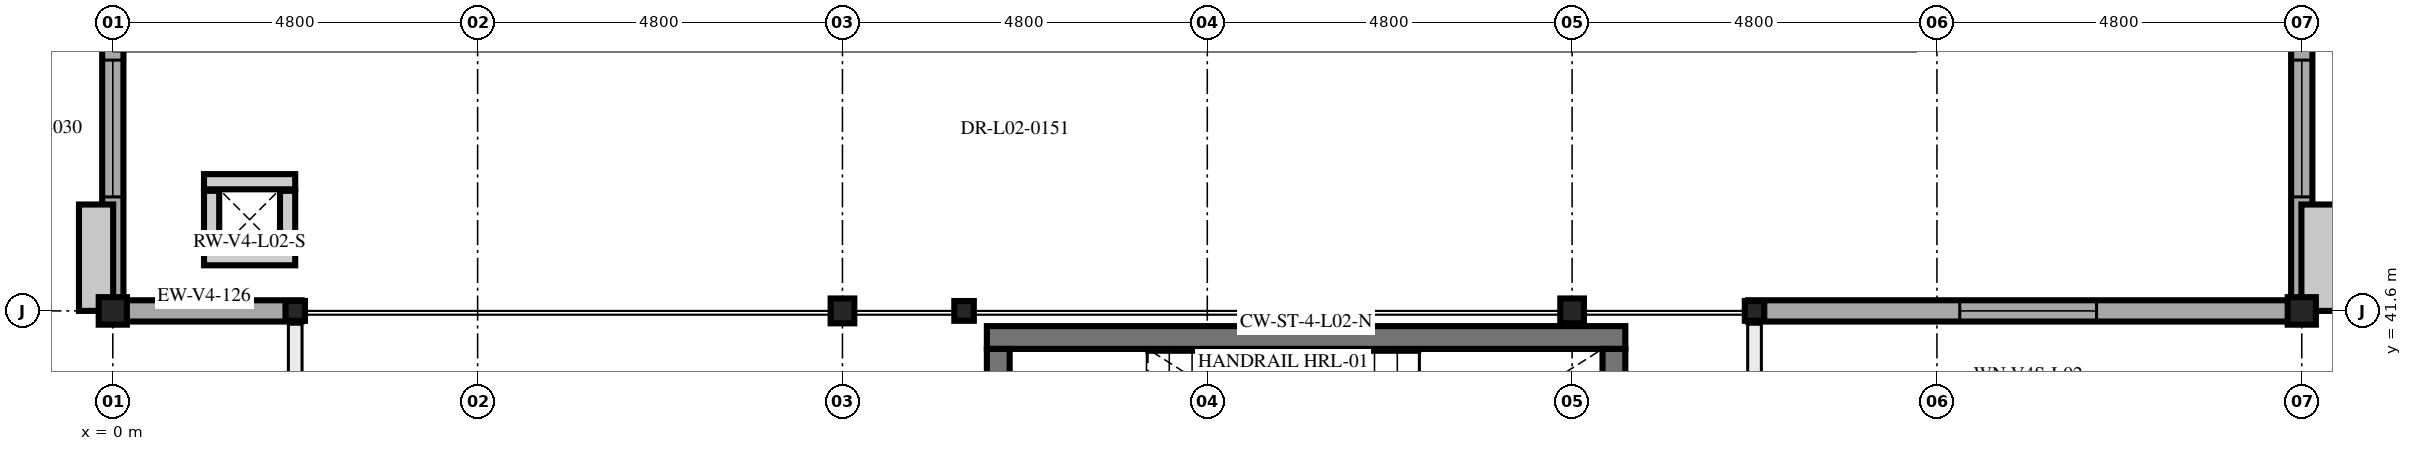
"""IFC4 building model, lengths in metres.
Left out: names, types, materials, properties, quantities, classifications, styles, units other than length and angle.
Written with IfcOpenShell. Run it as: python <this file> out.ifc"""

import sys

from ifc_helpers import new_model, si_unit, direction, frame, frame_2d, origin, origin_2d, place, context, subcontext, project, spatial, rectangle, i_section, extrude, element, fill, save


model = new_model("IFC4")
c1 = context("Model", 3, precision=1e-05, world=origin(), true_north=direction((0.0, 1.0)))
c2 = subcontext(c1, "Body", "Model", "MODEL_VIEW")
j1 = project(units=[si_unit("LENGTHUNIT", "METRE"), si_unit("PLANEANGLEUNIT", "RADIAN")], contexts=[c1])
p1 = place(None, origin())
s1 = spatial("IfcSite", under=j1, at=p1, CompositionType="ELEMENT")
p2 = place(p1, origin())
s2 = spatial("IfcBuilding", under=s1, at=p2, CompositionType="ELEMENT")
p3 = place(p2, frame((0.0, 0.0, 9.6)))
s3 = spatial("IfcBuildingStorey", under=s2, at=p3, CompositionType="ELEMENT", Elevation=9.6)
for number, where, z_axis, x_axis in (
    (1, (0.0, 41.6, 0.0), (0.0, 0.0, 1.0), (1.0, 0.0, 0.0)),
    (2, (28.8, 41.6, 0.0), (0.0, 0.0, 1.0), (1.0, 0.0, 0.0)),
):
    element("IfcColumn", number, at=place(p3, frame(where, z_axis=z_axis, x_axis=x_axis)), inside=s3, PredefinedType="COLUMN", context=c2, shape_type="SweptSolid", body=[
        extrude(i_section(OverallWidth=0.371, OverallDepth=0.362, WebThickness=0.012, FlangeThickness=0.021, at=origin_2d()), origin(), (0.0, 0.0, 1.0), 4.5),
    ])
for number, where, z_axis, x_axis in (
    (3, (9.6, 41.6, 0.0), (0.0, 0.0, 1.0), (1.0, 0.0, 0.0)),
    (4, (19.2, 41.6, 0.0), (0.0, 0.0, 1.0), (1.0, 0.0, 0.0)),
):
    element("IfcColumn", number, at=place(p3, frame(where, z_axis=z_axis, x_axis=x_axis)), inside=s3, PredefinedType="COLUMN", context=c2, shape_type="SweptSolid", body=[
        extrude(i_section(OverallWidth=0.311, OverallDepth=0.327, WebThickness=0.016, FlangeThickness=0.025, at=origin_2d()), origin(), (0.0, 0.0, 1.0), 4.5),
    ])
for number, where, z_axis, x_axis in (
    (5, (2.4, 41.6, 0.0), (0.0, 0.0, 1.0), (1.0, 0.0, 0.0)),
    (6, (11.2, 41.6, 0.0), (0.0, 0.0, 1.0), (1.0, 0.0, 0.0)),
    (7, (21.6, 41.6, 0.0), (0.0, 0.0, 1.0), (1.0, 0.0, 0.0)),
):
    element("IfcColumn", number, at=place(p3, frame(where, z_axis=z_axis, x_axis=x_axis)), inside=s3, PredefinedType="COLUMN", context=c2, shape_type="SweptSolid", body=[
        extrude(i_section(OverallWidth=0.256, OverallDepth=0.26, WebThickness=0.01, FlangeThickness=0.017, at=origin_2d()), origin(), (0.0, 0.0, 1.0), 4.5),
    ])
p4 = place(p3, frame((11.5, 41.25, 0.0), z_axis=(0.0, 0.0, 1.0), x_axis=(1.0, 0.0, 0.0)))
e8 = element("IfcWall", 8, at=p4, inside=s3, PredefinedType="SHEAR", context=c2, shape_type="SweptSolid", body=[
    extrude(rectangle(XDim=8.4, YDim=0.3, at=frame_2d((4.2, 0.0))), origin(), (0.0, 0.0, 1.0), 4.26),
])
p5 = place(p3, frame((11.65, 37.3, 0.0), z_axis=(0.0, 0.0, 1.0), x_axis=(0.0, 1.0, 0.0)))
e9 = element("IfcWall", 9, at=p5, inside=s3, PredefinedType="SHEAR", context=c2, shape_type="SweptSolid", body=[
    extrude(rectangle(XDim=3.8, YDim=0.3, at=frame_2d((1.9, 0.0))), origin(), (0.0, 0.0, 1.0), 4.26),
])
p6 = place(p5, frame((1.35, 0.0, 0.0)))
e10 = element("IfcOpeningElement", 10, at=p6, cuts=e9, PredefinedType="OPENING", context=c2, shape_type="SweptSolid", body=[
    extrude(rectangle(XDim=1.1, YDim=2.2, at=frame_2d((0.55, 1.1))), frame((0.0, 0.16, 0.0), z_axis=(0.0, -1.0, 0.0), x_axis=(1.0, 0.0, 0.0)), (0.0, 0.0, 1.0), 0.32),
])
p7 = place(p3, frame((19.75, 41.1, 0.0), z_axis=(0.0, 0.0, 1.0), x_axis=(0.0, -1.0, 0.0)))
e11 = element("IfcWall", 11, at=p7, inside=s3, PredefinedType="SHEAR", context=c2, shape_type="SweptSolid", body=[
    extrude(rectangle(XDim=3.8, YDim=0.3, at=frame_2d((1.9, 0.0))), origin(), (0.0, 0.0, 1.0), 4.26),
])
for number, where, z_axis, x_axis in (
    (12, (2.4, 42.3, 0.0), (0.0, 0.0, 1.0), (-1.0, 0.0, 0.0)),
    (13, (1.2, 43.3, 0.0), (0.0, 0.0, 1.0), (1.0, 0.0, 0.0)),
):
    element("IfcWall", number, at=place(p3, frame(where, z_axis=z_axis, x_axis=x_axis)), inside=s3, PredefinedType="PARTITIONING", context=c2, shape_type="SweptSolid", body=[
        extrude(rectangle(XDim=1.2, YDim=0.2, at=frame_2d((0.6, 0.0))), origin(), (0.0, 0.0, 1.0), 3.76),
    ])
for number, where, z_axis, x_axis in (
    (14, (1.3, 42.42, 0.0), (0.0, 0.0, 1.0), (0.0, 1.0, 0.0)),
    (15, (2.3, 43.18, 0.0), (0.0, 0.0, 1.0), (0.0, -1.0, 0.0)),
):
    element("IfcWall", number, at=place(p3, frame(where, z_axis=z_axis, x_axis=x_axis)), inside=s3, PredefinedType="PARTITIONING", context=c2, shape_type="SweptSolid", body=[
        extrude(rectangle(XDim=0.76, YDim=0.2, at=frame_2d((0.38, 0.0))), origin(), (0.0, 0.0, 1.0), 3.76),
    ])
p8 = place(p3, frame((2.485, 41.6, 0.0), z_axis=(0.0, 0.0, 1.0), x_axis=(-1.0, 0.0, 0.0)))
e16 = element("IfcWall", 16, at=p8, inside=s3, PredefinedType="SOLIDWALL", context=c2, shape_type="SweptSolid", body=[
    extrude(rectangle(XDim=2.57, YDim=0.28, at=frame_2d((1.285, 0.0))), origin(), (0.0, 0.0, 1.0), 3.702),
])
p9 = place(p3, frame((28.885, 41.6, 0.0), z_axis=(0.0, 0.0, 1.0), x_axis=(-1.0, 0.0, 0.0)))
e17 = element("IfcWall", 17, at=p9, inside=s3, PredefinedType="SOLIDWALL", context=c2, shape_type="SweptSolid", body=[
    extrude(rectangle(XDim=7.37, YDim=0.28, at=frame_2d((3.685, 0.0))), origin(), (0.0, 0.0, 1.0), 3.702),
])
p10 = place(p9, frame((2.785, 0.0, 1.0)))
e18 = element("IfcOpeningElement", 18, at=p10, cuts=e17, PredefinedType="OPENING", context=c2, shape_type="SweptSolid", body=[
    extrude(rectangle(XDim=1.8, YDim=2.1, at=frame_2d((0.9, 1.05))), frame((0.0, 0.15, 0.0), z_axis=(0.0, -1.0, 0.0), x_axis=(1.0, 0.0, 0.0)), (0.0, 0.0, 1.0), 0.3),
])
p11 = place(p3, frame((0.0, 41.515, 0.0), z_axis=(0.0, 0.0, 1.0), x_axis=(0.0, 1.0, 0.0)))
e19 = element("IfcWall", 19, at=p11, inside=s3, PredefinedType="SOLIDWALL", context=c2, shape_type="SweptSolid", body=[
    extrude(rectangle(XDim=4.97, YDim=0.28, at=frame_2d((2.485, 0.0))), origin(), (0.0, 0.0, 1.0), 3.635),
])
p12 = place(p11, frame((1.585, 0.0, 1.0)))
e20 = element("IfcOpeningElement", 20, at=p12, cuts=e19, PredefinedType="OPENING", context=c2, shape_type="SweptSolid", body=[
    extrude(rectangle(XDim=1.8, YDim=2.1, at=frame_2d((0.9, 1.05))), frame((0.0, 0.15, 0.0), z_axis=(0.0, -1.0, 0.0), x_axis=(1.0, 0.0, 0.0)), (0.0, 0.0, 1.0), 0.3),
])
p13 = place(p3, frame((28.8, 46.485, 0.0), z_axis=(0.0, 0.0, 1.0), x_axis=(0.0, -1.0, 0.0)))
e21 = element("IfcWall", 21, at=p13, inside=s3, PredefinedType="SOLIDWALL", context=c2, shape_type="SweptSolid", body=[
    extrude(rectangle(XDim=4.97, YDim=0.28, at=frame_2d((2.485, 0.0))), origin(), (0.0, 0.0, 1.0), 3.635),
])
p14 = place(p13, frame((1.585, 0.0, 1.0)))
e22 = element("IfcOpeningElement", 22, at=p14, cuts=e21, PredefinedType="OPENING", context=c2, shape_type="SweptSolid", body=[
    extrude(rectangle(XDim=1.8, YDim=2.1, at=frame_2d((0.9, 1.05))), frame((0.0, 0.15, 0.0), z_axis=(0.0, -1.0, 0.0), x_axis=(1.0, 0.0, 0.0)), (0.0, 0.0, 1.0), 0.3),
])
p15 = place(p10, origin())
e23 = element("IfcWindow", 23, at=p15, inside=s3, PartitioningType="SINGLE_PANEL", PredefinedType="WINDOW", context=c2, shape_type="SweptSolid", body=[
    extrude(rectangle(XDim=1.8, YDim=2.1, at=frame_2d((0.9, 1.05))), frame((0.0, 0.03, 0.0), z_axis=(0.0, -1.0, 0.0), x_axis=(1.0, 0.0, 0.0)), (0.0, 0.0, 1.0), 0.06),
])
fill(e18, e23)
p16 = place(p12, origin())
e24 = element("IfcWindow", 24, at=p16, inside=s3, PartitioningType="SINGLE_PANEL", PredefinedType="WINDOW", context=c2, shape_type="SweptSolid", body=[
    extrude(rectangle(XDim=1.8, YDim=2.1, at=frame_2d((0.9, 1.05))), frame((0.0, 0.03, 0.0), z_axis=(0.0, -1.0, 0.0), x_axis=(1.0, 0.0, 0.0)), (0.0, 0.0, 1.0), 0.06),
])
fill(e20, e24)
p17 = place(p14, origin())
e25 = element("IfcWindow", 25, at=p17, inside=s3, PartitioningType="SINGLE_PANEL", PredefinedType="WINDOW", context=c2, shape_type="SweptSolid", body=[
    extrude(rectangle(XDim=1.8, YDim=2.1, at=frame_2d((0.9, 1.05))), frame((0.0, 0.03, 0.0), z_axis=(0.0, -1.0, 0.0), x_axis=(1.0, 0.0, 0.0)), (0.0, 0.0, 1.0), 0.06),
])
fill(e22, e25)
save(model, sys.argv[1])
